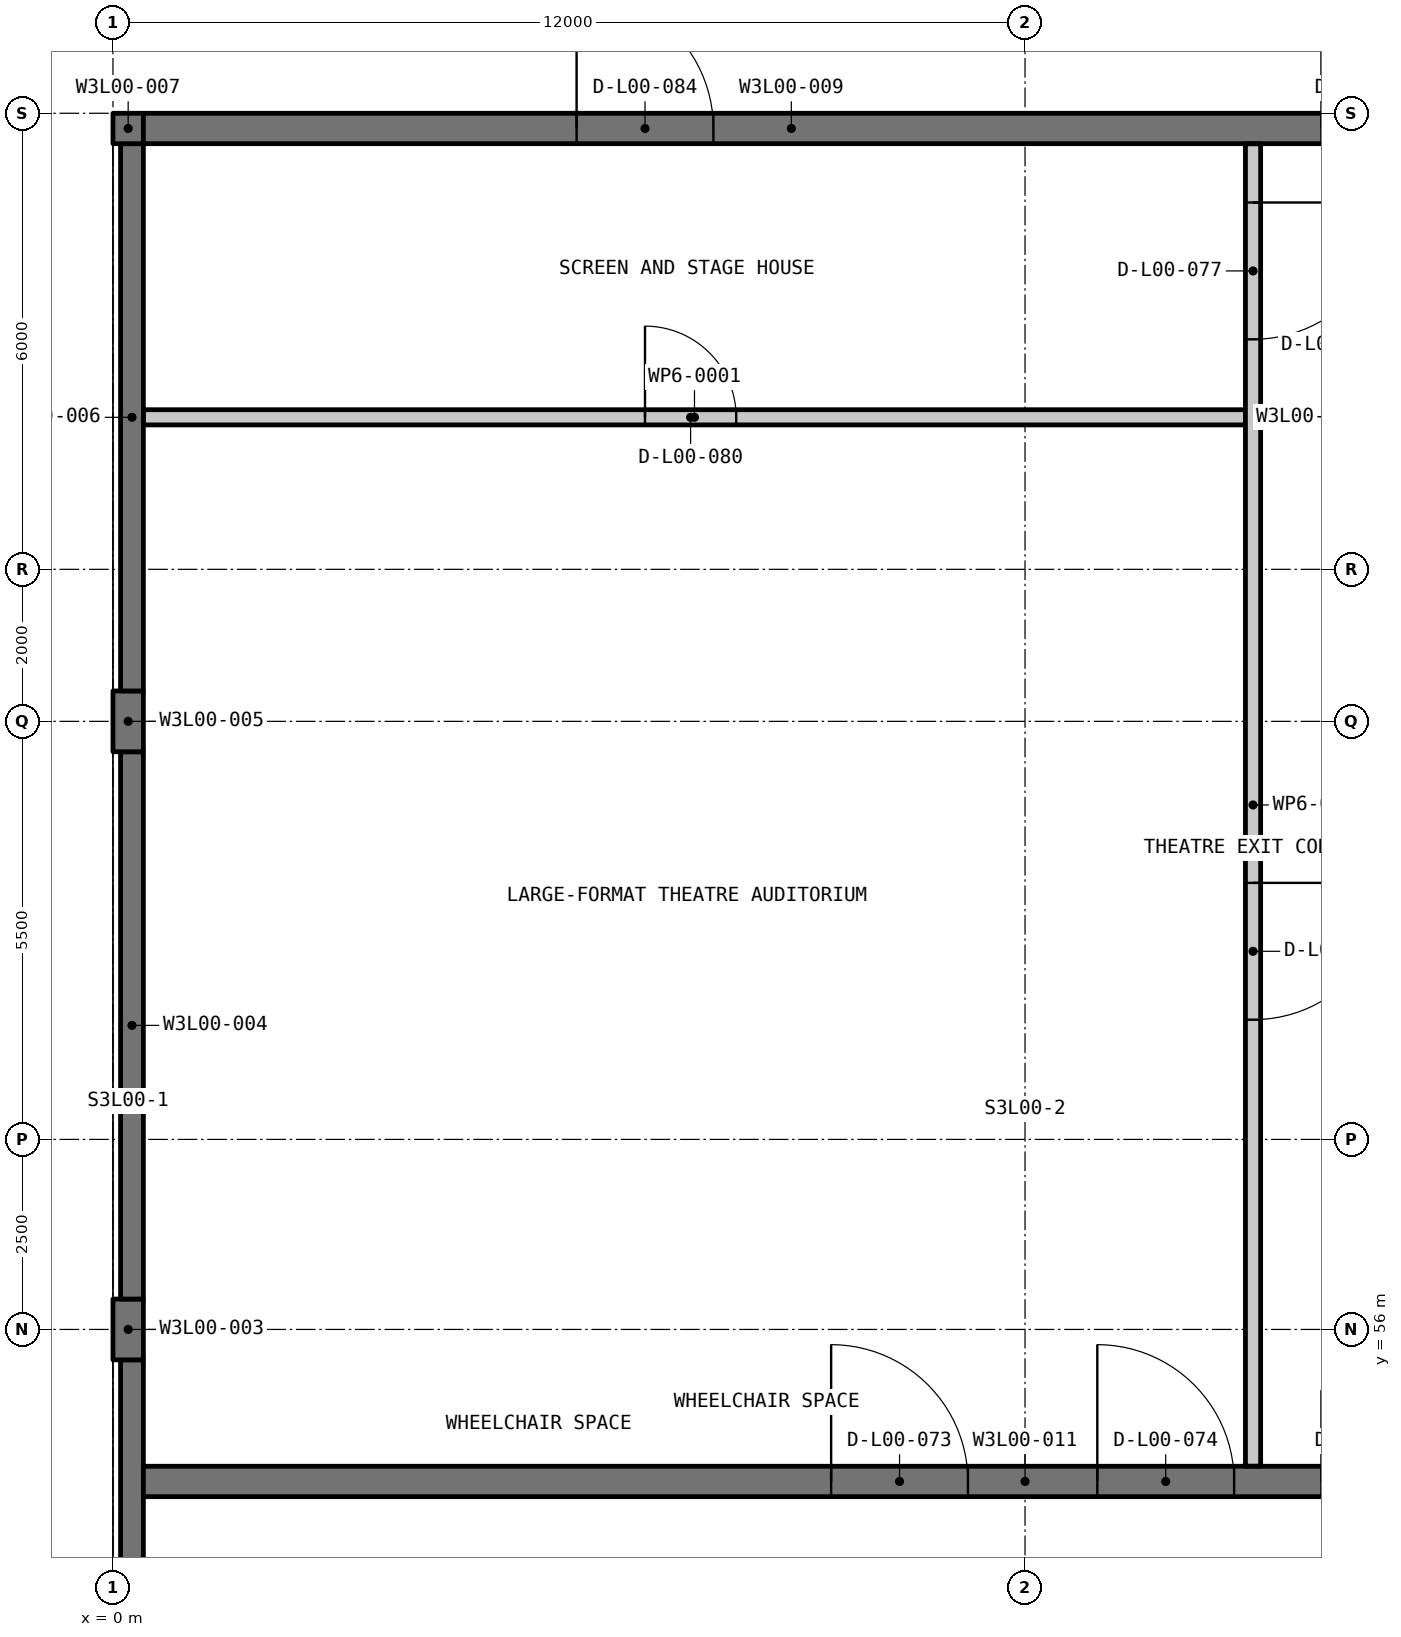
"""IFC4 building model, lengths in metres.
Left out: names, types, materials, properties, quantities, classifications, styles, units other than length and angle.
Written with IfcOpenShell. Run it as: python <this file> out.ifc"""

import sys

from ifc_helpers import new_model, si_unit, direction, frame, frame_2d, origin, place, context, subcontext, project, spatial, rectangle, extrude, element, fill, save


model = new_model("IFC4")
c1 = context("Model", 3, precision=1e-05, world=origin(), true_north=direction((0.0, 1.0)))
c2 = subcontext(c1, "Body", "Model", "MODEL_VIEW")
j1 = project(units=[si_unit("LENGTHUNIT", "METRE"), si_unit("PLANEANGLEUNIT", "RADIAN")], contexts=[c1])
p1 = place(None, origin())
s1 = spatial("IfcSite", under=j1, at=p1, CompositionType="ELEMENT")
p2 = place(p1, origin())
s2 = spatial("IfcBuilding", under=s1, at=p2, CompositionType="ELEMENT")
p3 = place(p2, origin())
s3 = spatial("IfcBuildingStorey", under=s2, at=p3, CompositionType="ELEMENT", Elevation=0.0)
p4 = place(p3, frame((0.25, 48.4, -0.2), z_axis=(0.0, 0.0, 1.0), x_axis=(0.0, 1.0, 0.0)))
e1 = element("IfcWall", 1, at=p4, inside=s3, PredefinedType="SOLIDWALL", context=c2, shape_type="SweptSolid", body=[
    extrude(rectangle(XDim=7.2, YDim=0.3, at=frame_2d((3.6, 0.0))), origin(), (0.0, 0.0, 1.0), 5.9),
])
p5 = place(p3, frame((0.2, 55.6, -0.2), z_axis=(0.0, 0.0, 1.0), x_axis=(0.0, 1.0, 0.0)))
e2 = element("IfcWall", 2, at=p5, inside=s3, PredefinedType="SOLIDWALL", context=c2, shape_type="SweptSolid", body=[
    extrude(rectangle(XDim=0.8, YDim=0.4, at=frame_2d((0.4, 0.0))), origin(), (0.0, 0.0, 1.0), 5.9),
])
p6 = place(p3, frame((0.25, 56.4, -0.2), z_axis=(0.0, 0.0, 1.0), x_axis=(0.0, 1.0, 0.0)))
e3 = element("IfcWall", 3, at=p6, inside=s3, PredefinedType="SOLIDWALL", context=c2, shape_type="SweptSolid", body=[
    extrude(rectangle(XDim=7.2, YDim=0.3, at=frame_2d((3.6, 0.0))), origin(), (0.0, 0.0, 1.0), 5.9),
])
p7 = place(p3, frame((0.2, 63.6, -0.2), z_axis=(0.0, 0.0, 1.0), x_axis=(0.0, 1.0, 0.0)))
e4 = element("IfcWall", 4, at=p7, inside=s3, PredefinedType="SOLIDWALL", context=c2, shape_type="SweptSolid", body=[
    extrude(rectangle(XDim=0.8, YDim=0.4, at=frame_2d((0.4, 0.0))), origin(), (0.0, 0.0, 1.0), 5.9),
])
p8 = place(p3, frame((0.25, 64.4, -0.2), z_axis=(0.0, 0.0, 1.0), x_axis=(0.0, 1.0, 0.0)))
e5 = element("IfcWall", 5, at=p8, inside=s3, PredefinedType="SOLIDWALL", context=c2, shape_type="SweptSolid", body=[
    extrude(rectangle(XDim=7.2, YDim=0.3, at=frame_2d((3.6, 0.0))), origin(), (0.0, 0.0, 1.0), 5.9),
])
p9 = place(p3, frame((0.2, 71.6, -0.2), z_axis=(0.0, 0.0, 1.0), x_axis=(0.0, 1.0, 0.0)))
e6 = element("IfcWall", 6, at=p9, inside=s3, PredefinedType="SOLIDWALL", context=c2, shape_type="SweptSolid", body=[
    extrude(rectangle(XDim=0.4, YDim=0.4, at=frame_2d((0.2, 0.0))), origin(), (0.0, 0.0, 1.0), 5.9),
])
p10 = place(p3, frame((0.4, 71.8, -0.2), z_axis=(0.0, 0.0, 1.0), x_axis=(1.0, 0.0, 0.0)))
e7 = element("IfcWall", 7, at=p10, inside=s3, PredefinedType="SOLIDWALL", context=c2, shape_type="SweptSolid", body=[
    extrude(rectangle(XDim=17.05, YDim=0.4, at=frame_2d((8.525, 0.0))), origin(), (0.0, 0.0, 1.0), 5.9),
])
p11 = place(p10, frame((15.5, 0.0, 0.2)))
e8 = element("IfcOpeningElement", 8, at=p11, cuts=e7, PredefinedType="OPENING", context=c2, shape_type="SweptSolid", body=[
    extrude(rectangle(XDim=1.2, YDim=2.2, at=frame_2d((0.6, 1.1))), frame((0.0, 0.21, 0.0), z_axis=(0.0, -1.0, 0.0), x_axis=(1.0, 0.0, 0.0)), (0.0, 0.0, 1.0), 0.42),
])
p12 = place(p10, frame((5.7, 0.0, 0.2)))
e9 = element("IfcOpeningElement", 9, at=p12, cuts=e7, PredefinedType="OPENING", context=c2, shape_type="SweptSolid", body=[
    extrude(rectangle(XDim=1.8, YDim=2.2, at=frame_2d((0.9, 1.1))), frame((0.0, 0.21, 0.0), z_axis=(0.0, -1.0, 0.0), x_axis=(1.0, 0.0, 0.0)), (0.0, 0.0, 1.0), 0.42),
])
p13 = place(p3, frame((0.4, 54.0, -0.2), z_axis=(0.0, 0.0, 1.0), x_axis=(1.0, 0.0, 0.0)))
e10 = element("IfcWall", 10, at=p13, inside=s3, PredefinedType="SOLIDWALL", context=c2, shape_type="SweptSolid", body=[
    extrude(rectangle(XDim=23.2, YDim=0.4, at=frame_2d((11.6, 0.0))), origin(), (0.0, 0.0, 1.0), 5.9),
])
p14 = place(p13, frame((9.049, 0.0, 0.2)))
e11 = element("IfcOpeningElement", 11, at=p14, cuts=e10, PredefinedType="OPENING", context=c2, shape_type="SweptSolid", body=[
    extrude(rectangle(XDim=1.8, YDim=2.1, at=frame_2d((0.9, 1.05))), frame((0.0, 0.21, 0.0), z_axis=(0.0, -1.0, 0.0), x_axis=(1.0, 0.0, 0.0)), (0.0, 0.0, 1.0), 0.42),
])
p15 = place(p13, frame((12.551, 0.0, 0.2)))
e12 = element("IfcOpeningElement", 12, at=p15, cuts=e10, PredefinedType="OPENING", context=c2, shape_type="SweptSolid", body=[
    extrude(rectangle(XDim=1.8, YDim=2.1, at=frame_2d((0.9, 1.05))), frame((0.0, 0.21, 0.0), z_axis=(0.0, -1.0, 0.0), x_axis=(1.0, 0.0, 0.0)), (0.0, 0.0, 1.0), 0.42),
])
p16 = place(p13, frame((15.5, 0.0, 0.2)))
e13 = element("IfcOpeningElement", 13, at=p16, cuts=e10, PredefinedType="OPENING", context=c2, shape_type="SweptSolid", body=[
    extrude(rectangle(XDim=1.2, YDim=2.1, at=frame_2d((0.6, 1.05))), frame((0.0, 0.21, 0.0), z_axis=(0.0, -1.0, 0.0), x_axis=(1.0, 0.0, 0.0)), (0.0, 0.0, 1.0), 0.42),
])
p17 = place(p3, frame((0.402, 68.0, 0.0), z_axis=(0.0, 0.0, 1.0), x_axis=(1.0, 0.0, 0.0)))
e14 = element("IfcWall", 14, at=p17, inside=s3, PredefinedType="PARTITIONING", context=c2, shape_type="SweptSolid", body=[
    extrude(rectangle(XDim=14.498, YDim=0.2, at=frame_2d((7.249, 0.0))), origin(), (0.0, 0.0, 1.0), 12.738),
])
p18 = place(p17, frame((6.598, 0.0, 0.0)))
e15 = element("IfcOpeningElement", 15, at=p18, cuts=e14, PredefinedType="OPENING", context=c2, shape_type="SweptSolid", body=[
    extrude(rectangle(XDim=1.2, YDim=2.1, at=frame_2d((0.6, 1.05))), frame((0.0, 0.11, 0.0), z_axis=(0.0, -1.0, 0.0), x_axis=(1.0, 0.0, 0.0)), (0.0, 0.0, 1.0), 0.22),
])
p19 = place(p3, frame((15.0, 71.598, 0.0), z_axis=(0.0, 0.0, 1.0), x_axis=(0.0, -1.0, 0.0)))
e16 = element("IfcWall", 16, at=p19, inside=s3, PredefinedType="PARTITIONING", context=c2, shape_type="SweptSolid", body=[
    extrude(rectangle(XDim=17.396, YDim=0.2, at=frame_2d((8.698, 0.0))), origin(), (0.0, 0.0, 1.0), 12.175),
])
p20 = place(p19, frame((9.723, 0.0, 0.0)))
e17 = element("IfcOpeningElement", 17, at=p20, cuts=e16, PredefinedType="OPENING", context=c2, shape_type="SweptSolid", body=[
    extrude(rectangle(XDim=1.8, YDim=2.1, at=frame_2d((0.9, 1.05))), frame((0.0, 0.11, 0.0), z_axis=(0.0, -1.0, 0.0), x_axis=(1.0, 0.0, 0.0)), (0.0, 0.0, 1.0), 0.22),
])
p21 = place(p19, frame((0.772, 0.0, 0.0)))
e18 = element("IfcOpeningElement", 18, at=p21, cuts=e16, PredefinedType="OPENING", context=c2, shape_type="SweptSolid", body=[
    extrude(rectangle(XDim=1.8, YDim=2.1, at=frame_2d((0.9, 1.05))), frame((0.0, 0.11, 0.0), z_axis=(0.0, -1.0, 0.0), x_axis=(1.0, 0.0, 0.0)), (0.0, 0.0, 1.0), 0.22),
])
p22 = place(p12, origin())
e19 = element("IfcDoor", 19, at=p22, inside=s3, OperationType="SINGLE_SWING_LEFT", PredefinedType="DOOR", context=c2, shape_type="SweptSolid", body=[
    extrude(rectangle(XDim=1.8, YDim=2.2, at=frame_2d((0.9, 1.1))), frame((0.0, 0.025, 0.0), z_axis=(0.0, -1.0, 0.0), x_axis=(1.0, 0.0, 0.0)), (0.0, 0.0, 1.0), 0.05),
])
fill(e9, e19)
p23 = place(p14, origin())
e20 = element("IfcDoor", 20, at=p23, inside=s3, OperationType="DOUBLE_DOOR_SINGLE_SWING", PredefinedType="DOOR", context=c2, shape_type="SweptSolid", body=[
    extrude(rectangle(XDim=1.8, YDim=2.1, at=frame_2d((0.9, 1.05))), frame((0.0, 0.025, 0.0), z_axis=(0.0, -1.0, 0.0), x_axis=(1.0, 0.0, 0.0)), (0.0, 0.0, 1.0), 0.05),
])
fill(e11, e20)
p24 = place(p15, origin())
e21 = element("IfcDoor", 21, at=p24, inside=s3, OperationType="DOUBLE_DOOR_SINGLE_SWING", PredefinedType="DOOR", context=c2, shape_type="SweptSolid", body=[
    extrude(rectangle(XDim=1.8, YDim=2.1, at=frame_2d((0.9, 1.05))), frame((0.0, 0.025, 0.0), z_axis=(0.0, -1.0, 0.0), x_axis=(1.0, 0.0, 0.0)), (0.0, 0.0, 1.0), 0.05),
])
fill(e12, e21)
p25 = place(p20, origin())
e22 = element("IfcDoor", 22, at=p25, inside=s3, OperationType="DOUBLE_DOOR_SINGLE_SWING", PredefinedType="DOOR", context=c2, shape_type="SweptSolid", body=[
    extrude(rectangle(XDim=1.8, YDim=2.1, at=frame_2d((0.9, 1.05))), frame((0.0, 0.025, 0.0), z_axis=(0.0, -1.0, 0.0), x_axis=(1.0, 0.0, 0.0)), (0.0, 0.0, 1.0), 0.05),
])
fill(e17, e22)
p26 = place(p21, origin())
e23 = element("IfcDoor", 23, at=p26, inside=s3, OperationType="DOUBLE_DOOR_SINGLE_SWING", PredefinedType="DOOR", context=c2, shape_type="SweptSolid", body=[
    extrude(rectangle(XDim=1.8, YDim=2.1, at=frame_2d((0.9, 1.05))), frame((0.0, 0.025, 0.0), z_axis=(0.0, -1.0, 0.0), x_axis=(1.0, 0.0, 0.0)), (0.0, 0.0, 1.0), 0.05),
])
fill(e18, e23)
p27 = place(p18, origin())
e24 = element("IfcDoor", 24, at=p27, inside=s3, OperationType="SINGLE_SWING_RIGHT", PredefinedType="DOOR", context=c2, shape_type="SweptSolid", body=[
    extrude(rectangle(XDim=1.2, YDim=2.1, at=frame_2d((0.6, 1.05))), frame((0.0, 0.025, 0.0), z_axis=(0.0, -1.0, 0.0), x_axis=(1.0, 0.0, 0.0)), (0.0, 0.0, 1.0), 0.05),
])
fill(e15, e24)
save(model, sys.argv[1])
